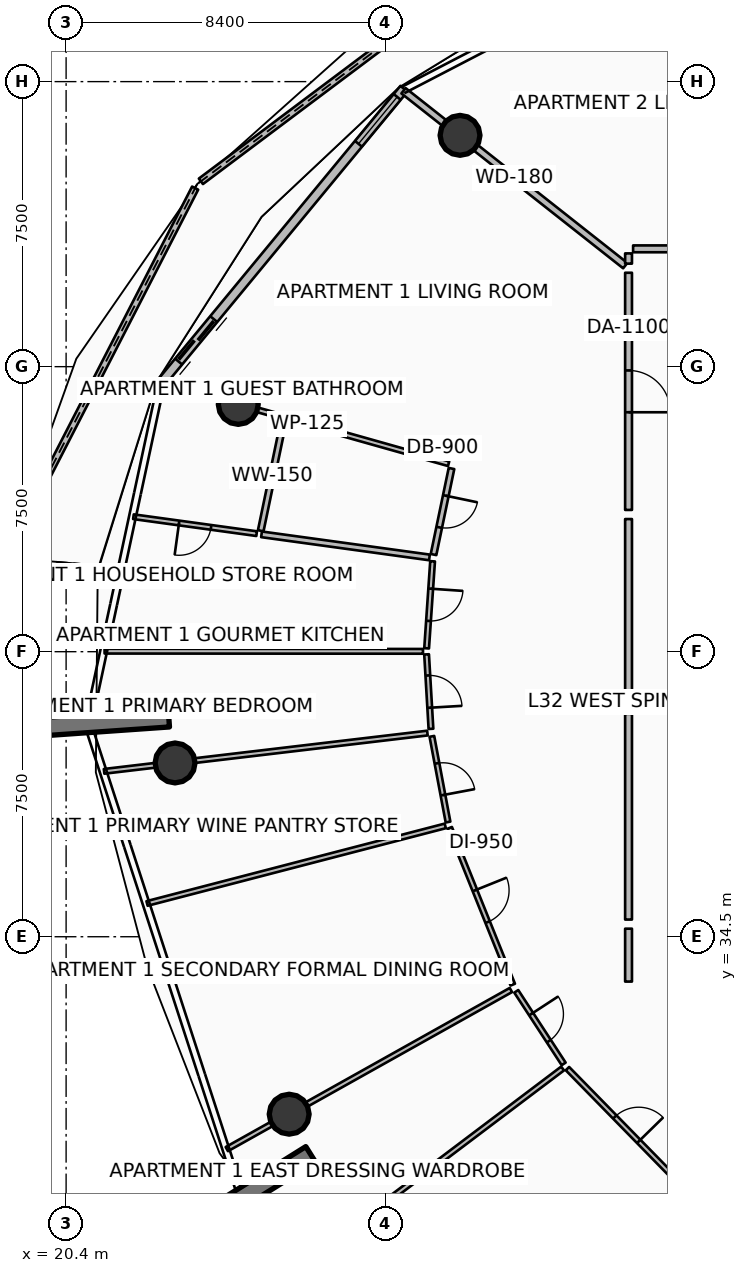
"""IFC4 building model, lengths in metres.
Left out: names, types, materials, properties, quantities, classifications, styles, units other than length and angle.
Written with IfcOpenShell. Run it as: python <this file> out.ifc"""

import sys

from ifc_helpers import new_model, si_unit, direction, frame, frame_2d, origin, origin_2d, place, context, subcontext, project, spatial, polyline, rectangle, circle, outline, extrude, element, fill, save


model = new_model("IFC4")
c1 = context("Model", 3, precision=1e-05, world=origin(), true_north=direction((0.0, 1.0)))
c2 = subcontext(c1, "Body", "Model", "MODEL_VIEW")
j1 = project(units=[si_unit("LENGTHUNIT", "METRE"), si_unit("PLANEANGLEUNIT", "RADIAN")], contexts=[c1])
p1 = place(None, origin())
s1 = spatial("IfcSite", under=j1, at=p1, CompositionType="ELEMENT")
p2 = place(p1, origin())
s2 = spatial("IfcBuilding", under=s1, at=p2, CompositionType="ELEMENT")
p3 = place(p2, frame((0.0, 0.0, 131.55)))
s3 = spatial("IfcBuildingStorey", under=s2, at=p3, CompositionType="ELEMENT", Elevation=131.55)
for number, where, z_axis, x_axis in (
    (1, (23.103, 40.259, 0.0), (0.0, 0.0, 1.0), (-0.998, -0.07, 0.0)),
    (2, (26.835, 28.774, 0.0), (0.0, 0.0, 1.0), (-0.848, -0.53, 0.0)),
):
    element("IfcWall", number, at=place(p3, frame(where, z_axis=z_axis, x_axis=x_axis)), inside=s3, PredefinedType="SOLIDWALL", context=c2, shape_type="SweptSolid", body=[
        extrude(rectangle(XDim=3.5, YDim=0.48, at=frame_2d((1.75, 0.0))), origin(), (0.0, 0.0, 1.0), 3.75),
    ])
for number, where, z_axis, x_axis in (
    (3, (30.766, 55.586, 0.0), (0.0, 0.0, 1.0), (1.0, 0.0, 0.0)),
    (4, (24.93, 48.506, 0.0), (0.0, 0.0, 1.0), (1.0, 0.0, 0.0)),
    (5, (23.267, 39.073, 0.0), (0.0, 0.0, 1.0), (1.0, 0.0, 0.0)),
    (6, (26.27, 29.831, 0.0), (0.0, 0.0, 1.0), (1.0, 0.0, 0.0)),
):
    element("IfcColumn", number, at=place(p3, frame(where, z_axis=z_axis, x_axis=x_axis)), inside=s3, PredefinedType="COLUMN", context=c2, shape_type="SweptSolid", body=[
        extrude(circle(Radius=0.525, at=origin_2d()), origin(), (0.0, 0.0, 1.0), 3.5),
    ])
p4 = place(p3, frame((32.046, 60.45, 0.0), z_axis=(0.0, 0.0, 1.0), x_axis=(-0.800078127259, -0.599895816189, 0.0)))
e7 = element("IfcWall", 7, at=p4, inside=s3, PredefinedType="PARAPET", context=c2, shape_type="SweptSolid", body=[
    extrude(outline(polyline([(0.0, 0.0), (10.124, 0.0), (10.124, 1.348), (5.062, 1.182), (0.0, 1.12), (0.0, 0.0)])), frame((0.0, 0.09, 0.0), z_axis=(0.0, -1.0, 0.0), x_axis=(1.0, 0.0, 0.0)), (0.0, 0.0, 1.0), 0.18),
])
p5 = place(p3, frame((23.796, 54.198, 0.0), z_axis=(0.0, 0.0, 1.0), x_axis=(-0.457378798552, -0.88927196888, 0.0)))
e8 = element("IfcWall", 8, at=p5, inside=s3, PredefinedType="PARAPET", context=c2, shape_type="SweptSolid", body=[
    extrude(outline(polyline([(0.0, 0.0), (10.93, 0.0), (10.93, 1.747), (5.465, 1.562), (0.0, 1.348), (0.0, 0.0)])), frame((0.0, 0.09, 0.0), z_axis=(0.0, -1.0, 0.0), x_axis=(1.0, 0.0, 0.0)), (0.0, 0.0, 1.0), 0.18),
])
p6 = place(p3, frame((29.291, 56.813, 0.0), z_axis=(0.0, 0.0, 1.0), x_axis=(-0.636771922292, -0.77105221547, 0.0)))
e9 = element("IfcWall", 9, at=p6, inside=s3, PredefinedType="SOLIDWALL", context=c2, shape_type="SweptSolid", body=[
    extrude(rectangle(XDim=10.082, YDim=0.24, at=frame_2d((5.041, 0.0))), origin(), (0.0, 0.0, 1.0), 2.45),
])
p7 = place(p6, frame((7.862, 0.0, 0.0)))
e10 = element("IfcOpeningElement", 10, at=p7, cuts=e9, PredefinedType="OPENING", context=c2, shape_type="SweptSolid", body=[
    extrude(rectangle(XDim=1.45, YDim=2.15, at=frame_2d((0.725, 1.075))), frame((0.0, 0.13, 0.0), z_axis=(0.0, -1.0, 0.0), x_axis=(1.0, 0.0, 0.0)), (0.0, 0.0, 1.0), 0.26),
])
p8 = place(p6, frame((0.28, 0.0, 0.65)))
e11 = element("IfcOpeningElement", 11, at=p8, cuts=e9, PredefinedType="OPENING", context=c2, shape_type="SweptSolid", body=[
    extrude(rectangle(XDim=1.6, YDim=1.5, at=frame_2d((0.8, 0.75))), frame((0.0, 0.13, 0.0), z_axis=(0.0, -1.0, 0.0), x_axis=(1.0, 0.0, 0.0)), (0.0, 0.0, 1.0), 0.26),
])
p9 = place(p3, frame((35.114, 52.159, 0.0), z_axis=(0.0, 0.0, 1.0), x_axis=(-0.78531739611, 0.619093359169, 0.0)))
e12 = element("IfcWall", 12, at=p9, inside=s3, PredefinedType="PARTITIONING", context=c2, shape_type="SweptSolid", body=[
    extrude(rectangle(XDim=7.43, YDim=0.18, at=frame_2d((3.715, 0.0))), origin(), (0.0, 0.0, 1.0), 2.94),
])
p10 = place(p3, frame((35.2, 51.971, 0.0), z_axis=(0.0, 0.0, 1.0), x_axis=(0.0, -1.0, 0.0)))
e13 = element("IfcWall", 13, at=p10, inside=s3, PredefinedType="PARTITIONING", context=c2, shape_type="SweptSolid", body=[
    extrude(rectangle(XDim=6.241, YDim=0.18, at=frame_2d((3.12, 0.0))), origin(), (0.0, 0.0, 1.0), 2.94),
])
p11 = place(p10, frame((2.57, 0.0, 0.0)))
e14 = element("IfcOpeningElement", 14, at=p11, cuts=e13, PredefinedType="OPENING", context=c2, shape_type="SweptSolid", body=[
    extrude(rectangle(XDim=1.1, YDim=2.1, at=frame_2d((0.55, 1.05))), frame((0.0, 0.1, 0.0), z_axis=(0.0, -1.0, 0.0), x_axis=(1.0, 0.0, 0.0)), (0.0, 0.0, 1.0), 0.2),
])
p12 = place(p3, frame((35.2, 45.49, 0.0), z_axis=(0.0, 0.0, 1.0), x_axis=(0.0, -1.0, 0.0)))
e15 = element("IfcWall", 15, at=p12, inside=s3, PredefinedType="PARTITIONING", context=c2, shape_type="SweptSolid", body=[
    extrude(rectangle(XDim=4.885, YDim=0.18, at=frame_2d((2.442, 0.0))), origin(), (0.0, 0.0, 1.0), 2.94),
])
p13 = place(p3, frame((30.465, 46.945, 0.0), z_axis=(0.0, 0.0, 1.0), x_axis=(-0.962456021196, 0.271437667363, 0.0)))
e16 = element("IfcWall", 16, at=p13, inside=s3, PredefinedType="PARTITIONING", context=c2, shape_type="SweptSolid", body=[
    extrude(rectangle(XDim=7.732, YDim=0.125, at=frame_2d((3.866, 0.0))), origin(), (0.0, 0.0, 1.0), 2.94),
])
p14 = place(p3, frame((30.541, 46.82, 0.0), z_axis=(0.0, 0.0, 1.0), x_axis=(-0.20437157278, -0.978893385533, 0.0)))
e17 = element("IfcWall", 17, at=p14, inside=s3, PredefinedType="PARTITIONING", context=c2, shape_type="SweptSolid", body=[
    extrude(rectangle(XDim=2.313, YDim=0.15, at=frame_2d((1.156, 0.0))), origin(), (0.0, 0.0, 1.0), 2.94),
])
p15 = place(p14, frame((0.731, 0.0, 0.0)))
e18 = element("IfcOpeningElement", 18, at=p15, cuts=e17, PredefinedType="OPENING", context=c2, shape_type="SweptSolid", body=[
    extrude(rectangle(XDim=0.85, YDim=2.06, at=frame_2d((0.425, 1.03))), frame((0.0, 0.085, 0.0), z_axis=(0.0, -1.0, 0.0), x_axis=(1.0, 0.0, 0.0)), (0.0, 0.0, 1.0), 0.17),
])
p16 = place(p3, frame((26.123, 48.066, 0.0), z_axis=(0.0, 0.0, 1.0), x_axis=(-0.204410847423, -0.978885185022, 0.0)))
e19 = element("IfcWall", 19, at=p16, inside=s3, PredefinedType="PARTITIONING", context=c2, shape_type="SweptSolid", body=[
    extrude(rectangle(XDim=2.947, YDim=0.15, at=frame_2d((1.473, 0.0))), origin(), (0.0, 0.0, 1.0), 2.94),
])
p17 = place(p3, frame((29.961, 44.481, 0.0), z_axis=(0.0, 0.0, 1.0), x_axis=(-0.99067496126, 0.136246545396, 0.0)))
e20 = element("IfcWall", 20, at=p17, inside=s3, PredefinedType="PARTITIONING", context=c2, shape_type="SweptSolid", body=[
    extrude(rectangle(XDim=4.46, YDim=0.15, at=frame_2d((2.23, 0.0))), origin(), (0.0, 0.0, 1.0), 2.94),
])
p18 = place(p3, frame((25.414, 45.106, 0.0), z_axis=(0.0, 0.0, 1.0), x_axis=(-0.990676070786, 0.136238477576, 0.0)))
e21 = element("IfcWall", 21, at=p18, inside=s3, PredefinedType="PARTITIONING", context=c2, shape_type="SweptSolid", body=[
    extrude(rectangle(XDim=3.272, YDim=0.125, at=frame_2d((1.636, 0.0))), origin(), (0.0, 0.0, 1.0), 2.94),
])
p19 = place(p18, frame((1.211, 0.0, 0.0)))
e22 = element("IfcOpeningElement", 22, at=p19, cuts=e21, PredefinedType="OPENING", context=c2, shape_type="SweptSolid", body=[
    extrude(rectangle(XDim=0.85, YDim=2.06, at=frame_2d((0.425, 1.03))), frame((0.0, 0.073, 0.0), z_axis=(0.0, -1.0, 0.0), x_axis=(1.0, 0.0, 0.0)), (0.0, 0.0, 1.0), 0.145),
])
p20 = place(p3, frame((29.791, 42.01, 0.0), z_axis=(0.0, 0.0, 1.0), x_axis=(-0.999999862447, 0.000524506018, 0.0)))
e23 = element("IfcWall", 23, at=p20, inside=s3, PredefinedType="PARTITIONING", context=c2, shape_type="SweptSolid", body=[
    extrude(rectangle(XDim=8.378, YDim=0.125, at=frame_2d((4.189, 0.0))), origin(), (0.0, 0.0, 1.0), 2.94),
])
p21 = place(p3, frame((30.044, 44.379, 0.0), z_axis=(0.0, 0.0, 1.0), x_axis=(-0.068510010266, -0.997650429005, 0.0)))
e24 = element("IfcWall", 24, at=p21, inside=s3, PredefinedType="PARTITIONING", context=c2, shape_type="SweptSolid", body=[
    extrude(rectangle(XDim=2.295, YDim=0.125, at=frame_2d((1.147, 0.0))), origin(), (0.0, 0.0, 1.0), 2.94),
])
p22 = place(p21, frame((0.722, 0.0, 0.0)))
e25 = element("IfcOpeningElement", 25, at=p22, cuts=e24, PredefinedType="OPENING", context=c2, shape_type="SweptSolid", body=[
    extrude(rectangle(XDim=0.85, YDim=2.06, at=frame_2d((0.425, 1.03))), frame((0.0, 0.073, 0.0), z_axis=(0.0, -1.0, 0.0), x_axis=(1.0, 0.0, 0.0)), (0.0, 0.0, 1.0), 0.145),
])
p23 = place(p3, frame((29.886, 41.929, 0.0), z_axis=(0.0, 0.0, 1.0), x_axis=(0.058590761666, -0.998282085709, 0.0)))
e26 = element("IfcWall", 26, at=p23, inside=s3, PredefinedType="PARTITIONING", context=c2, shape_type="SweptSolid", body=[
    extrude(rectangle(XDim=1.963, YDim=0.125, at=frame_2d((0.981, 0.0))), origin(), (0.0, 0.0, 1.0), 2.94),
])
p24 = place(p23, frame((0.556, 0.0, 0.0)))
e27 = element("IfcOpeningElement", 27, at=p24, cuts=e26, PredefinedType="OPENING", context=c2, shape_type="SweptSolid", body=[
    extrude(rectangle(XDim=0.85, YDim=2.06, at=frame_2d((0.425, 1.03))), frame((0.0, 0.073, 0.0), z_axis=(0.0, -1.0, 0.0), x_axis=(1.0, 0.0, 0.0)), (0.0, 0.0, 1.0), 0.145),
])
p25 = place(p3, frame((35.2, 40.365, 0.0), z_axis=(0.0, 0.0, 1.0), x_axis=(0.0, -1.0, 0.0)))
e28 = element("IfcWall", 28, at=p25, inside=s3, PredefinedType="PARTITIONING", context=c2, shape_type="SweptSolid", body=[
    extrude(rectangle(XDim=5.413, YDim=0.18, at=frame_2d((2.707, 0.0))), origin(), (0.0, 0.0, 1.0), 2.94),
])
p26 = place(p3, frame((29.907, 39.858, 0.0), z_axis=(0.0, 0.0, 1.0), x_axis=(-0.993070228419, -0.117522429465, 0.0)))
e29 = element("IfcWall", 29, at=p26, inside=s3, PredefinedType="PARTITIONING", context=c2, shape_type="SweptSolid", body=[
    extrude(rectangle(XDim=8.567, YDim=0.125, at=frame_2d((4.284, 0.0))), origin(), (0.0, 0.0, 1.0), 2.94),
])
p27 = place(p3, frame((30.377, 37.416, 0.0), z_axis=(0.0, 0.0, 1.0), x_axis=(-0.967798305948, -0.251726913549, 0.0)))
e30 = element("IfcWall", 30, at=p27, inside=s3, PredefinedType="PARTITIONING", context=c2, shape_type="SweptSolid", body=[
    extrude(rectangle(XDim=8.109, YDim=0.125, at=frame_2d((4.055, 0.0))), origin(), (0.0, 0.0, 1.0), 2.94),
])
p28 = place(p3, frame((30.025, 39.772, 0.0), z_axis=(0.0, 0.0, 1.0), x_axis=(0.185072404157, -0.98272488786, 0.0)))
e31 = element("IfcWall", 31, at=p28, inside=s3, PredefinedType="PARTITIONING", context=c2, shape_type="SweptSolid", body=[
    extrude(rectangle(XDim=2.294, YDim=0.125, at=frame_2d((1.147, 0.0))), origin(), (0.0, 0.0, 1.0), 2.94),
])
p29 = place(p28, frame((0.722, 0.0, 0.0)))
e32 = element("IfcOpeningElement", 32, at=p29, cuts=e31, PredefinedType="OPENING", context=c2, shape_type="SweptSolid", body=[
    extrude(rectangle(XDim=0.85, YDim=2.06, at=frame_2d((0.425, 1.03))), frame((0.0, 0.073, 0.0), z_axis=(0.0, -1.0, 0.0), x_axis=(1.0, 0.0, 0.0)), (0.0, 0.0, 1.0), 0.145),
])
p30 = place(p3, frame((30.494, 37.365, 0.0), z_axis=(0.0, 0.0, 1.0), x_axis=(0.373198093248, -0.927751681861, 0.0)))
e33 = element("IfcWall", 33, at=p30, inside=s3, PredefinedType="PARTITIONING", context=c2, shape_type="SweptSolid", body=[
    extrude(rectangle(XDim=4.447, YDim=0.125, at=frame_2d((2.223, 0.0))), origin(), (0.0, 0.0, 1.0), 2.94),
])
p31 = place(p30, frame((1.773, 0.0, 0.0)))
e34 = element("IfcOpeningElement", 34, at=p31, cuts=e33, PredefinedType="OPENING", context=c2, shape_type="SweptSolid", body=[
    extrude(rectangle(XDim=0.9, YDim=2.08, at=frame_2d((0.45, 1.04))), frame((0.0, 0.073, 0.0), z_axis=(0.0, -1.0, 0.0), x_axis=(1.0, 0.0, 0.0)), (0.0, 0.0, 1.0), 0.145),
])
p32 = place(p3, frame((35.2, 34.712, 0.0), z_axis=(0.0, 0.0, 1.0), x_axis=(0.0, -1.0, 0.0)))
e35 = element("IfcWall", 35, at=p32, inside=s3, PredefinedType="PARTITIONING", context=c2, shape_type="SweptSolid", body=[
    extrude(rectangle(XDim=1.392, YDim=0.18, at=frame_2d((0.696, 0.0))), origin(), (0.0, 0.0, 1.0), 2.94),
])
p33 = place(p3, frame((32.104, 33.098, 0.0), z_axis=(0.0, 0.0, 1.0), x_axis=(-0.872488035617, -0.488635475283, 0.0)))
e36 = element("IfcWall", 36, at=p33, inside=s3, PredefinedType="PARTITIONING", context=c2, shape_type="SweptSolid", body=[
    extrude(rectangle(XDim=8.567, YDim=0.125, at=frame_2d((4.284, 0.0))), origin(), (0.0, 0.0, 1.0), 2.94),
])
p34 = place(p3, frame((33.464, 31.033, 0.0), z_axis=(0.0, 0.0, 1.0), x_axis=(-0.798260006805, -0.602313009602, 0.0)))
e37 = element("IfcWall", 37, at=p34, inside=s3, PredefinedType="PARTITIONING", context=c2, shape_type="SweptSolid", body=[
    extrude(rectangle(XDim=8.283, YDim=0.125, at=frame_2d((4.142, 0.0))), origin(), (0.0, 0.0, 1.0), 2.94),
])
p35 = place(p3, frame((32.246, 33.063, 0.0), z_axis=(0.0, 0.0, 1.0), x_axis=(0.54671843355, -0.837316519852, 0.0)))
e38 = element("IfcWall", 38, at=p35, inside=s3, PredefinedType="PARTITIONING", context=c2, shape_type="SweptSolid", body=[
    extrude(rectangle(XDim=2.28, YDim=0.125, at=frame_2d((1.14, 0.0))), origin(), (0.0, 0.0, 1.0), 2.94),
])
p36 = place(p35, frame((0.715, 0.0, 0.0)))
e39 = element("IfcOpeningElement", 39, at=p36, cuts=e38, PredefinedType="OPENING", context=c2, shape_type="SweptSolid", body=[
    extrude(rectangle(XDim=0.85, YDim=2.06, at=frame_2d((0.425, 1.03))), frame((0.0, 0.073, 0.0), z_axis=(0.0, -1.0, 0.0), x_axis=(1.0, 0.0, 0.0)), (0.0, 0.0, 1.0), 0.145),
])
p37 = place(p3, frame((33.592, 31.03, 0.0), z_axis=(0.0, 0.0, 1.0), x_axis=(0.699540960256, -0.714592502707, 0.0)))
e40 = element("IfcWall", 40, at=p37, inside=s3, PredefinedType="PARTITIONING", context=c2, shape_type="SweptSolid", body=[
    extrude(rectangle(XDim=4.461, YDim=0.125, at=frame_2d((2.23, 0.0))), origin(), (0.0, 0.0, 1.0), 2.94),
])
p38 = place(p37, frame((1.78, 0.0, 0.0)))
e41 = element("IfcOpeningElement", 41, at=p38, cuts=e40, PredefinedType="OPENING", context=c2, shape_type="SweptSolid", body=[
    extrude(rectangle(XDim=0.9, YDim=2.08, at=frame_2d((0.45, 1.04))), frame((0.0, 0.073, 0.0), z_axis=(0.0, -1.0, 0.0), x_axis=(1.0, 0.0, 0.0)), (0.0, 0.0, 1.0), 0.145),
])
p39 = place(p3, frame((41.944, 52.6, 0.0), z_axis=(0.0, 0.0, 1.0), x_axis=(-1.0, 0.0, 0.0)))
e42 = element("IfcWall", 42, at=p39, inside=s3, PredefinedType="PARTITIONING", context=c2, shape_type="SweptSolid", body=[
    extrude(rectangle(XDim=6.624, YDim=0.18, at=frame_2d((3.312, 0.0))), origin(), (0.0, 0.0, 1.0), 2.94),
])
p40 = place(p39, frame((2.762, 0.0, 0.0)))
e43 = element("IfcOpeningElement", 43, at=p40, cuts=e42, PredefinedType="OPENING", context=c2, shape_type="SweptSolid", body=[
    extrude(rectangle(XDim=1.1, YDim=2.1, at=frame_2d((0.55, 1.05))), frame((0.0, 0.1, 0.0), z_axis=(0.0, -1.0, 0.0), x_axis=(1.0, 0.0, 0.0)), (0.0, 0.0, 1.0), 0.2),
])
p41 = place(p3, frame((35.2, 52.48, 0.0), z_axis=(0.0, 0.0, 1.0), x_axis=(0.0, -1.0, 0.0)))
e44 = element("IfcWall", 44, at=p41, inside=s3, PredefinedType="PARTITIONING", context=c2, shape_type="SweptSolid", body=[
    extrude(rectangle(XDim=0.269, YDim=0.18, at=frame_2d((0.135, 0.0))), origin(), (0.0, 0.0, 1.0), 2.94),
])
p42 = place(p7, origin())
e45 = element("IfcDoor", 45, at=p42, inside=s3, OperationType="DOUBLE_DOOR_SLIDING", PredefinedType="DOOR", context=c2, shape_type="SweptSolid", body=[
    extrude(rectangle(XDim=1.45, YDim=2.15, at=frame_2d((0.725, 1.075))), frame((0.0, 0.025, 0.0), z_axis=(0.0, -1.0, 0.0), x_axis=(1.0, 0.0, 0.0)), (0.0, 0.0, 1.0), 0.05),
])
fill(e10, e45)
p43 = place(p8, origin())
e46 = element("IfcWindow", 46, at=p43, inside=s3, PartitioningType="SINGLE_PANEL", PredefinedType="WINDOW", context=c2, shape_type="SweptSolid", body=[
    extrude(rectangle(XDim=1.6, YDim=1.5, at=frame_2d((0.8, 0.75))), frame((0.0, 0.03, 0.0), z_axis=(0.0, -1.0, 0.0), x_axis=(1.0, 0.0, 0.0)), (0.0, 0.0, 1.0), 0.06),
])
fill(e11, e46)
p44 = place(p11, origin())
e47 = element("IfcDoor", 47, at=p44, inside=s3, OperationType="SINGLE_SWING_RIGHT", PredefinedType="DOOR", context=c2, shape_type="SweptSolid", body=[
    extrude(rectangle(XDim=1.1, YDim=2.1, at=frame_2d((0.55, 1.05))), frame((0.0, 0.025, 0.0), z_axis=(0.0, -1.0, 0.0), x_axis=(1.0, 0.0, 0.0)), (0.0, 0.0, 1.0), 0.05),
])
fill(e14, e47)
p45 = place(p15, origin())
e48 = element("IfcDoor", 48, at=p45, inside=s3, OperationType="SINGLE_SWING_LEFT", PredefinedType="DOOR", context=c2, shape_type="SweptSolid", body=[
    extrude(rectangle(XDim=0.85, YDim=2.06, at=frame_2d((0.425, 1.03))), frame((0.0, 0.025, 0.0), z_axis=(0.0, -1.0, 0.0), x_axis=(1.0, 0.0, 0.0)), (0.0, 0.0, 1.0), 0.05),
])
fill(e18, e48)
p46 = place(p19, origin())
e49 = element("IfcDoor", 49, at=p46, inside=s3, OperationType="SINGLE_SWING_RIGHT", PredefinedType="DOOR", context=c2, shape_type="SweptSolid", body=[
    extrude(rectangle(XDim=0.85, YDim=2.06, at=frame_2d((0.425, 1.03))), frame((0.0, 0.025, 0.0), z_axis=(0.0, -1.0, 0.0), x_axis=(1.0, 0.0, 0.0)), (0.0, 0.0, 1.0), 0.05),
])
fill(e22, e49)
p47 = place(p22, origin())
e50 = element("IfcDoor", 50, at=p47, inside=s3, OperationType="SINGLE_SWING_LEFT", PredefinedType="DOOR", context=c2, shape_type="SweptSolid", body=[
    extrude(rectangle(XDim=0.85, YDim=2.06, at=frame_2d((0.425, 1.03))), frame((0.0, 0.025, 0.0), z_axis=(0.0, -1.0, 0.0), x_axis=(1.0, 0.0, 0.0)), (0.0, 0.0, 1.0), 0.05),
])
fill(e25, e50)
p48 = place(p24, origin())
e51 = element("IfcDoor", 51, at=p48, inside=s3, OperationType="SINGLE_SWING_RIGHT", PredefinedType="DOOR", context=c2, shape_type="SweptSolid", body=[
    extrude(rectangle(XDim=0.85, YDim=2.06, at=frame_2d((0.425, 1.03))), frame((0.0, 0.025, 0.0), z_axis=(0.0, -1.0, 0.0), x_axis=(1.0, 0.0, 0.0)), (0.0, 0.0, 1.0), 0.05),
])
fill(e27, e51)
p49 = place(p29, origin())
e52 = element("IfcDoor", 52, at=p49, inside=s3, OperationType="SINGLE_SWING_RIGHT", PredefinedType="DOOR", context=c2, shape_type="SweptSolid", body=[
    extrude(rectangle(XDim=0.85, YDim=2.06, at=frame_2d((0.425, 1.03))), frame((0.0, 0.025, 0.0), z_axis=(0.0, -1.0, 0.0), x_axis=(1.0, 0.0, 0.0)), (0.0, 0.0, 1.0), 0.05),
])
fill(e32, e52)
p50 = place(p31, origin())
e53 = element("IfcDoor", 53, at=p50, inside=s3, OperationType="SINGLE_SWING_LEFT", PredefinedType="DOOR", context=c2, shape_type="SweptSolid", body=[
    extrude(rectangle(XDim=0.9, YDim=2.08, at=frame_2d((0.45, 1.04))), frame((0.0, 0.025, 0.0), z_axis=(0.0, -1.0, 0.0), x_axis=(1.0, 0.0, 0.0)), (0.0, 0.0, 1.0), 0.05),
])
fill(e34, e53)
p51 = place(p36, origin())
e54 = element("IfcDoor", 54, at=p51, inside=s3, OperationType="SINGLE_SWING_LEFT", PredefinedType="DOOR", context=c2, shape_type="SweptSolid", body=[
    extrude(rectangle(XDim=0.85, YDim=2.06, at=frame_2d((0.425, 1.03))), frame((0.0, 0.025, 0.0), z_axis=(0.0, -1.0, 0.0), x_axis=(1.0, 0.0, 0.0)), (0.0, 0.0, 1.0), 0.05),
])
fill(e39, e54)
p52 = place(p38, origin())
e55 = element("IfcDoor", 55, at=p52, inside=s3, OperationType="SINGLE_SWING_RIGHT", PredefinedType="DOOR", context=c2, shape_type="SweptSolid", body=[
    extrude(rectangle(XDim=0.9, YDim=2.08, at=frame_2d((0.45, 1.04))), frame((0.0, 0.025, 0.0), z_axis=(0.0, -1.0, 0.0), x_axis=(1.0, 0.0, 0.0)), (0.0, 0.0, 1.0), 0.05),
])
fill(e41, e55)
save(model, sys.argv[1])
